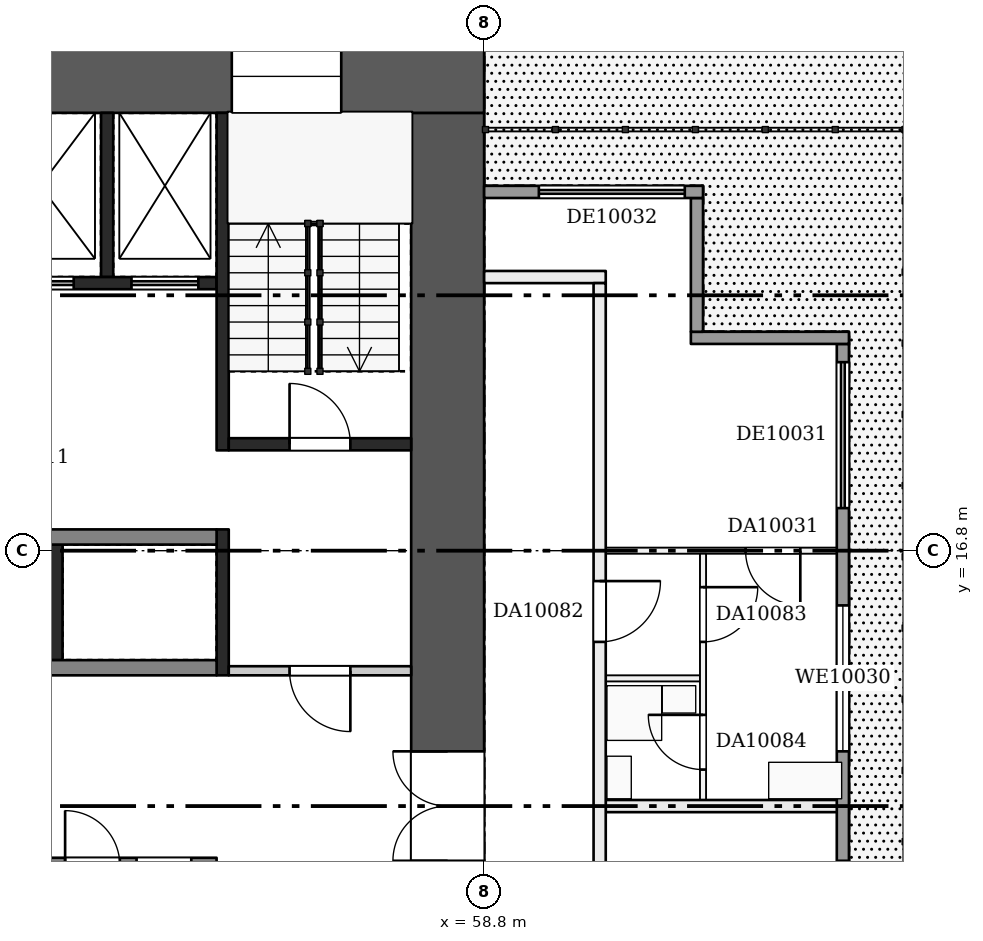
"""IFC4 building model, lengths in metres.
Left out: names, types, materials, properties, quantities, classifications, styles, units other than length and angle.
Written with IfcOpenShell. Run it as: python <this file> out.ifc"""

import sys

from ifc_helpers import new_model, si_unit, direction, frame, frame_2d, origin, place, context, subcontext, project, spatial, rectangle, extrude, element, fill, save


model = new_model("IFC4")
c1 = context("Model", 3, precision=1e-05, world=origin(), true_north=direction((0.0, 1.0)))
c2 = subcontext(c1, "Body", "Model", "MODEL_VIEW")
j1 = project(units=[si_unit("LENGTHUNIT", "METRE"), si_unit("PLANEANGLEUNIT", "RADIAN")], contexts=[c1])
p1 = place(None, origin())
s1 = spatial("IfcSite", under=j1, at=p1, CompositionType="ELEMENT")
p2 = place(p1, origin())
s2 = spatial("IfcBuilding", under=s1, at=p2, CompositionType="ELEMENT")
p3 = place(p2, frame((0.0, 0.0, 46.2)))
s3 = spatial("IfcBuildingStorey", under=s2, at=p3, CompositionType="ELEMENT", Elevation=46.2)
p4 = place(p3, frame((42.0, 24.6, 0.0), z_axis=(0.0, 0.0, 1.0), x_axis=(1.0, 0.0, 0.0)))
e1 = element("IfcWall", 1, at=p4, inside=s3, PredefinedType="SHEAR", context=c2, shape_type="SweptSolid", body=[
    extrude(rectangle(XDim=16.8, YDim=1.2, at=frame_2d((8.4, 0.0))), origin(), (0.0, 0.0, 1.0), 3.22),
])
p5 = place(p4, frame((1.8, 0.0, 0.5)))
e2 = element("IfcOpeningElement", 2, at=p5, cuts=e1, PredefinedType="OPENING", context=c2, shape_type="SweptSolid", body=[
    extrude(rectangle(XDim=1.8, YDim=2.4, at=frame_2d((0.9, 1.2))), frame((0.0, 0.61, 0.0), z_axis=(0.0, -1.0, 0.0), x_axis=(1.0, 0.0, 0.0)), (0.0, 0.0, 1.0), 1.22),
])
p6 = place(p4, frame((4.625, 0.0, 1.6)))
e3 = element("IfcOpeningElement", 3, at=p6, cuts=e1, PredefinedType="OPENING", context=c2, shape_type="SweptSolid", body=[
    extrude(rectangle(XDim=1.8, YDim=1.2, at=frame_2d((0.9, 0.6))), frame((0.0, 0.61, 0.0), z_axis=(0.0, -1.0, 0.0), x_axis=(1.0, 0.0, 0.0)), (0.0, 0.0, 1.0), 1.22),
])
p7 = place(p4, frame((7.05, 0.0, 1.6)))
e4 = element("IfcOpeningElement", 4, at=p7, cuts=e1, PredefinedType="OPENING", context=c2, shape_type="SweptSolid", body=[
    extrude(rectangle(XDim=1.2, YDim=1.2, at=frame_2d((0.6, 0.6))), frame((0.0, 0.61, 0.0), z_axis=(0.0, -1.0, 0.0), x_axis=(1.0, 0.0, 0.0)), (0.0, 0.0, 1.0), 1.22),
])
p8 = place(p4, frame((12.65, 0.0, 0.5)))
e5 = element("IfcOpeningElement", 5, at=p8, cuts=e1, PredefinedType="OPENING", context=c2, shape_type="SweptSolid", body=[
    extrude(rectangle(XDim=1.8, YDim=2.4, at=frame_2d((0.9, 1.2))), frame((0.0, 0.61, 0.0), z_axis=(0.0, -1.0, 0.0), x_axis=(1.0, 0.0, 0.0)), (0.0, 0.0, 1.0), 1.22),
])
p9 = place(p3, frame((58.2, 9.6, 0.0), z_axis=(0.0, 0.0, 1.0), x_axis=(0.0, 1.0, 0.0)))
e6 = element("IfcWall", 6, at=p9, inside=s3, PredefinedType="SHEAR", context=c2, shape_type="SweptSolid", body=[
    extrude(rectangle(XDim=14.4, YDim=1.2, at=frame_2d((7.2, 0.0))), origin(), (0.0, 0.0, 1.0), 3.22),
])
p10 = place(p9, frame((2.1, 0.0, 0.0)))
e7 = element("IfcOpeningElement", 7, at=p10, cuts=e6, PredefinedType="OPENING", context=c2, shape_type="SweptSolid", body=[
    extrude(rectangle(XDim=1.8, YDim=2.1, at=frame_2d((0.9, 1.05))), frame((0.0, 0.61, 0.0), z_axis=(0.0, -1.0, 0.0), x_axis=(1.0, 0.0, 0.0)), (0.0, 0.0, 1.0), 1.22),
])
p11 = place(p3, frame((46.4, 11.625, 0.0), z_axis=(0.0, 0.0, 1.0), x_axis=(1.0, 0.0, 0.0)))
e8 = element("IfcWall", 8, at=p11, inside=s3, PredefinedType="SHEAR", context=c2, shape_type="SweptSolid", body=[
    extrude(rectangle(XDim=8.0, YDim=0.25, at=frame_2d((4.0, 0.0))), origin(), (0.0, 0.0, 1.0), 3.22),
])
p12 = place(p11, frame((0.45, 0.0, 0.0)))
e9 = element("IfcOpeningElement", 9, at=p12, cuts=e8, PredefinedType="OPENING", context=c2, shape_type="SweptSolid", body=[
    extrude(rectangle(XDim=1.1, YDim=2.1, at=frame_2d((0.55, 1.05))), frame((0.0, 0.135, 0.0), z_axis=(0.0, -1.0, 0.0), x_axis=(1.0, 0.0, 0.0)), (0.0, 0.0, 1.0), 0.27),
])
p13 = place(p11, frame((2.25, 0.0, 0.0)))
e10 = element("IfcOpeningElement", 10, at=p13, cuts=e8, PredefinedType="OPENING", context=c2, shape_type="SweptSolid", body=[
    extrude(rectangle(XDim=1.1, YDim=2.1, at=frame_2d((0.55, 1.05))), frame((0.0, 0.135, 0.0), z_axis=(0.0, -1.0, 0.0), x_axis=(1.0, 0.0, 0.0)), (0.0, 0.0, 1.0), 0.27),
])
p14 = place(p11, frame((4.05, 0.0, 0.0)))
e11 = element("IfcOpeningElement", 11, at=p14, cuts=e8, PredefinedType="OPENING", context=c2, shape_type="SweptSolid", body=[
    extrude(rectangle(XDim=1.1, YDim=2.1, at=frame_2d((0.55, 1.05))), frame((0.0, 0.135, 0.0), z_axis=(0.0, -1.0, 0.0), x_axis=(1.0, 0.0, 0.0)), (0.0, 0.0, 1.0), 0.27),
])
p15 = place(p11, frame((5.509, 0.0, 0.0)))
e12 = element("IfcOpeningElement", 12, at=p15, cuts=e8, PredefinedType="OPENING", context=c2, shape_type="SweptSolid", body=[
    extrude(rectangle(XDim=0.9, YDim=2.1, at=frame_2d((0.45, 1.05))), frame((0.0, 0.135, 0.0), z_axis=(0.0, -1.0, 0.0), x_axis=(1.0, 0.0, 0.0)), (0.0, 0.0, 1.0), 0.27),
])
p16 = place(p11, frame((6.684, 0.0, 0.0)))
e13 = element("IfcOpeningElement", 13, at=p16, cuts=e8, PredefinedType="OPENING", context=c2, shape_type="SweptSolid", body=[
    extrude(rectangle(XDim=0.9, YDim=2.1, at=frame_2d((0.45, 1.05))), frame((0.0, 0.135, 0.0), z_axis=(0.0, -1.0, 0.0), x_axis=(1.0, 0.0, 0.0)), (0.0, 0.0, 1.0), 0.27),
])
p17 = place(p3, frame((51.767, 15.0, 0.0), z_axis=(0.0, 0.0, 1.0), x_axis=(0.0, 1.0, 0.0)))
e14 = element("IfcWall", 14, at=p17, inside=s3, PredefinedType="SHEAR", context=c2, shape_type="SweptSolid", body=[
    extrude(rectangle(XDim=1.9, YDim=0.2, at=frame_2d((0.95, 0.0))), origin(), (0.0, 0.0, 1.0), 3.22),
])
for number, where, z_axis, x_axis in (
    (15, (46.4, 14.875, 0.0), (0.0, 0.0, 1.0), (1.0, 0.0, 0.0)),
    (16, (46.4, 17.025, 0.0), (0.0, 0.0, 1.0), (1.0, 0.0, 0.0)),
):
    element("IfcWall", number, at=place(p3, frame(where, z_axis=z_axis, x_axis=x_axis)), inside=s3, PredefinedType="SHEAR", context=c2, shape_type="SweptSolid", body=[
        extrude(rectangle(XDim=8.0, YDim=0.25, at=frame_2d((4.0, 0.0))), origin(), (0.0, 0.0, 1.0), 3.22),
    ])
p18 = place(p3, frame((52.6, 21.3, 0.0), z_axis=(0.0, 0.0, 1.0), x_axis=(0.0, 1.0, 0.0)))
e17 = element("IfcWall", 17, at=p18, inside=s3, PredefinedType="SHEAR", context=c2, shape_type="SweptSolid", body=[
    extrude(rectangle(XDim=2.7, YDim=0.2, at=frame_2d((1.35, 0.0))), origin(), (0.0, 0.0, 1.0), 3.22),
])
p19 = place(p3, frame((46.4, 21.2, 0.0), z_axis=(0.0, 0.0, 1.0), x_axis=(1.0, 0.0, 0.0)))
e18 = element("IfcWall", 18, at=p19, inside=s3, PredefinedType="SHEAR", context=c2, shape_type="SweptSolid", body=[
    extrude(rectangle(XDim=8.0, YDim=0.2, at=frame_2d((4.0, 0.0))), origin(), (0.0, 0.0, 1.0), 3.22),
])
p20 = place(p19, frame((0.675, 0.0, 0.0)))
e19 = element("IfcOpeningElement", 19, at=p20, cuts=e18, PredefinedType="OPENING", context=c2, shape_type="SweptSolid", body=[
    extrude(rectangle(XDim=0.9, YDim=2.1, at=frame_2d((0.45, 1.05))), frame((0.0, 0.11, 0.0), z_axis=(0.0, -1.0, 0.0), x_axis=(1.0, 0.0, 0.0)), (0.0, 0.0, 1.0), 0.22),
])
p21 = place(p19, frame((2.7, 0.0, 0.0)))
e20 = element("IfcOpeningElement", 20, at=p21, cuts=e18, PredefinedType="OPENING", context=c2, shape_type="SweptSolid", body=[
    extrude(rectangle(XDim=0.9, YDim=2.1, at=frame_2d((0.45, 1.05))), frame((0.0, 0.11, 0.0), z_axis=(0.0, -1.0, 0.0), x_axis=(1.0, 0.0, 0.0)), (0.0, 0.0, 1.0), 0.22),
])
p22 = place(p19, frame((4.55, 0.0, 0.0)))
e21 = element("IfcOpeningElement", 21, at=p22, cuts=e18, PredefinedType="OPENING", context=c2, shape_type="SweptSolid", body=[
    extrude(rectangle(XDim=1.1, YDim=2.1, at=frame_2d((0.55, 1.05))), frame((0.0, 0.11, 0.0), z_axis=(0.0, -1.0, 0.0), x_axis=(1.0, 0.0, 0.0)), (0.0, 0.0, 1.0), 0.22),
])
p23 = place(p19, frame((6.6, 0.0, 0.0)))
e22 = element("IfcOpeningElement", 22, at=p23, cuts=e18, PredefinedType="OPENING", context=c2, shape_type="SweptSolid", body=[
    extrude(rectangle(XDim=1.1, YDim=2.1, at=frame_2d((0.55, 1.05))), frame((0.0, 0.11, 0.0), z_axis=(0.0, -1.0, 0.0), x_axis=(1.0, 0.0, 0.0)), (0.0, 0.0, 1.0), 0.22),
])
p24 = place(p3, frame((54.5, 14.75, 0.0), z_axis=(0.0, 0.0, 1.0), x_axis=(0.0, 1.0, 0.0)))
e23 = element("IfcWall", 23, at=p24, inside=s3, PredefinedType="SHEAR", context=c2, shape_type="SweptSolid", body=[
    extrude(rectangle(XDim=2.4, YDim=0.2, at=frame_2d((1.2, 0.0))), origin(), (0.0, 0.0, 1.0), 3.22),
])
p25 = place(p3, frame((54.5, 18.45, 0.0), z_axis=(0.0, 0.0, 1.0), x_axis=(0.0, 1.0, 0.0)))
e24 = element("IfcWall", 24, at=p25, inside=s3, PredefinedType="SHEAR", context=c2, shape_type="SweptSolid", body=[
    extrude(rectangle(XDim=5.55, YDim=0.2, at=frame_2d((2.775, 0.0))), origin(), (0.0, 0.0, 1.0), 3.22),
])
p26 = place(p3, frame((54.6, 14.825, 0.0), z_axis=(0.0, 0.0, 1.0), x_axis=(1.0, 0.0, 0.0)))
e25 = element("IfcWall", 25, at=p26, inside=s3, PredefinedType="PARTITIONING", context=c2, shape_type="SweptSolid", body=[
    extrude(rectangle(XDim=3.0, YDim=0.15, at=frame_2d((1.5, 0.0))), origin(), (0.0, 0.0, 1.0), 3.22),
])
p27 = place(p26, frame((1.0, 0.0, 0.0)))
e26 = element("IfcOpeningElement", 26, at=p27, cuts=e25, PredefinedType="OPENING", context=c2, shape_type="SweptSolid", body=[
    extrude(rectangle(XDim=1.0, YDim=2.1, at=frame_2d((0.5, 1.05))), frame((0.0, 0.085, 0.0), z_axis=(0.0, -1.0, 0.0), x_axis=(1.0, 0.0, 0.0)), (0.0, 0.0, 1.0), 0.17),
])
p28 = place(p3, frame((54.6, 18.55, 0.0), z_axis=(0.0, 0.0, 1.0), x_axis=(1.0, 0.0, 0.0)))
e27 = element("IfcWall", 27, at=p28, inside=s3, PredefinedType="SHEAR", context=c2, shape_type="SweptSolid", body=[
    extrude(rectangle(XDim=3.0, YDim=0.2, at=frame_2d((1.5, 0.0))), origin(), (0.0, 0.0, 1.0), 3.22),
])
p29 = place(p28, frame((1.0, 0.0, 0.0)))
e28 = element("IfcOpeningElement", 28, at=p29, cuts=e27, PredefinedType="OPENING", context=c2, shape_type="SweptSolid", body=[
    extrude(rectangle(XDim=1.0, YDim=2.1, at=frame_2d((0.5, 1.05))), frame((0.0, 0.11, 0.0), z_axis=(0.0, -1.0, 0.0), x_axis=(1.0, 0.0, 0.0)), (0.0, 0.0, 1.0), 0.22),
])
p30 = place(p3, frame((60.8, 12.6, 0.0), z_axis=(0.0, 0.0, 1.0), x_axis=(1.0, 0.0, 0.0)))
e29 = element("IfcWall", 29, at=p30, inside=s3, PredefinedType="PARTITIONING", context=c2, shape_type="SweptSolid", body=[
    extrude(rectangle(XDim=3.9, YDim=0.2, at=frame_2d((1.95, 0.0))), origin(), (0.0, 0.0, 1.0), 3.22),
])
p31 = place(p3, frame((60.8, 14.7, 0.0), z_axis=(0.0, 0.0, 1.0), x_axis=(1.0, 0.0, 0.0)))
e30 = element("IfcWall", 30, at=p31, inside=s3, PredefinedType="PARTITIONING", context=c2, shape_type="SweptSolid", body=[
    extrude(rectangle(XDim=1.55, YDim=0.1, at=frame_2d((0.775, 0.0))), origin(), (0.0, 0.0, 1.0), 3.22),
])
p32 = place(p3, frame((60.8, 16.8, 0.0), z_axis=(0.0, 0.0, 1.0), x_axis=(1.0, 0.0, 0.0)))
e31 = element("IfcWall", 31, at=p32, inside=s3, PredefinedType="PARTITIONING", context=c2, shape_type="SweptSolid", body=[
    extrude(rectangle(XDim=3.9, YDim=0.1, at=frame_2d((1.95, 0.0))), origin(), (0.0, 0.0, 1.0), 3.22),
])
p33 = place(p32, frame((2.3, 0.0, 0.0)))
e32 = element("IfcOpeningElement", 32, at=p33, cuts=e31, PredefinedType="OPENING", context=c2, shape_type="SweptSolid", body=[
    extrude(rectangle(XDim=0.9, YDim=2.1, at=frame_2d((0.45, 1.05))), frame((0.0, 0.06, 0.0), z_axis=(0.0, -1.0, 0.0), x_axis=(1.0, 0.0, 0.0)), (0.0, 0.0, 1.0), 0.12),
])
p34 = place(p3, frame((58.8, 21.3, 0.0), z_axis=(0.0, 0.0, 1.0), x_axis=(1.0, 0.0, 0.0)))
e33 = element("IfcWall", 33, at=p34, inside=s3, PredefinedType="PARTITIONING", context=c2, shape_type="SweptSolid", body=[
    extrude(rectangle(XDim=2.0, YDim=0.2, at=frame_2d((1.0, 0.0))), origin(), (0.0, 0.0, 1.0), 3.22),
])
p35 = place(p3, frame((60.7, 6.6, 0.0), z_axis=(0.0, 0.0, 1.0), x_axis=(0.0, 1.0, 0.0)))
e34 = element("IfcWall", 34, at=p35, inside=s3, PredefinedType="PARTITIONING", context=c2, shape_type="SweptSolid", body=[
    extrude(rectangle(XDim=14.6, YDim=0.2, at=frame_2d((7.3, 0.0))), origin(), (0.0, 0.0, 1.0), 3.22),
])
p36 = place(p35, frame((3.4, 0.0, 0.0)))
e35 = element("IfcOpeningElement", 35, at=p36, cuts=e34, PredefinedType="OPENING", context=c2, shape_type="SweptSolid", body=[
    extrude(rectangle(XDim=1.0, YDim=2.1, at=frame_2d((0.5, 1.05))), frame((0.0, 0.11, 0.0), z_axis=(0.0, -1.0, 0.0), x_axis=(1.0, 0.0, 0.0)), (0.0, 0.0, 1.0), 0.22),
])
p37 = place(p35, frame((8.7, 0.0, 0.0)))
e36 = element("IfcOpeningElement", 36, at=p37, cuts=e34, PredefinedType="OPENING", context=c2, shape_type="SweptSolid", body=[
    extrude(rectangle(XDim=1.0, YDim=2.1, at=frame_2d((0.5, 1.05))), frame((0.0, 0.11, 0.0), z_axis=(0.0, -1.0, 0.0), x_axis=(1.0, 0.0, 0.0)), (0.0, 0.0, 1.0), 0.22),
])
p38 = place(p3, frame((62.4, 12.7, 0.0), z_axis=(0.0, 0.0, 1.0), x_axis=(0.0, 1.0, 0.0)))
e37 = element("IfcWall", 37, at=p38, inside=s3, PredefinedType="PARTITIONING", context=c2, shape_type="SweptSolid", body=[
    extrude(rectangle(XDim=4.05, YDim=0.1, at=frame_2d((2.025, 0.0))), origin(), (0.0, 0.0, 1.0), 3.22),
])
p39 = place(p38, frame((2.6, 0.0, 0.0)))
e38 = element("IfcOpeningElement", 38, at=p39, cuts=e37, PredefinedType="OPENING", context=c2, shape_type="SweptSolid", body=[
    extrude(rectangle(XDim=0.9, YDim=2.1, at=frame_2d((0.45, 1.05))), frame((0.0, 0.06, 0.0), z_axis=(0.0, -1.0, 0.0), x_axis=(1.0, 0.0, 0.0)), (0.0, 0.0, 1.0), 0.12),
])
p40 = place(p38, frame((0.5, 0.0, 0.0)))
e39 = element("IfcOpeningElement", 39, at=p40, cuts=e37, PredefinedType="OPENING", context=c2, shape_type="SweptSolid", body=[
    extrude(rectangle(XDim=0.9, YDim=2.1, at=frame_2d((0.45, 1.05))), frame((0.0, 0.06, 0.0), z_axis=(0.0, -1.0, 0.0), x_axis=(1.0, 0.0, 0.0)), (0.0, 0.0, 1.0), 0.12),
])
p41 = place(p3, frame((64.7, 5.0, 0.0), z_axis=(0.0, 0.0, 1.0), x_axis=(0.0, 1.0, 0.0)))
e40 = element("IfcWall", 40, at=p41, inside=s3, PredefinedType="SOLIDWALL", context=c2, shape_type="SweptSolid", body=[
    extrude(rectangle(XDim=15.2, YDim=0.2, at=frame_2d((7.6, 0.0))), origin(), (0.0, 0.0, 1.0), 3.22),
])
p42 = place(p41, frame((0.3, 0.0, 0.9)))
e41 = element("IfcOpeningElement", 41, at=p42, cuts=e40, PredefinedType="OPENING", context=c2, shape_type="SweptSolid", body=[
    extrude(rectangle(XDim=2.4, YDim=1.5, at=frame_2d((1.2, 0.75))), frame((0.0, 0.11, 0.0), z_axis=(0.0, -1.0, 0.0), x_axis=(1.0, 0.0, 0.0)), (0.0, 0.0, 1.0), 0.22),
])
p43 = place(p41, frame((4.3, 0.0, 0.9)))
e42 = element("IfcOpeningElement", 42, at=p43, cuts=e40, PredefinedType="OPENING", context=c2, shape_type="SweptSolid", body=[
    extrude(rectangle(XDim=2.4, YDim=1.5, at=frame_2d((1.2, 0.75))), frame((0.0, 0.11, 0.0), z_axis=(0.0, -1.0, 0.0), x_axis=(1.0, 0.0, 0.0)), (0.0, 0.0, 1.0), 0.22),
])
p44 = place(p41, frame((8.5, 0.0, 0.9)))
e43 = element("IfcOpeningElement", 43, at=p44, cuts=e40, PredefinedType="OPENING", context=c2, shape_type="SweptSolid", body=[
    extrude(rectangle(XDim=2.4, YDim=1.5, at=frame_2d((1.2, 0.75))), frame((0.0, 0.11, 0.0), z_axis=(0.0, -1.0, 0.0), x_axis=(1.0, 0.0, 0.0)), (0.0, 0.0, 1.0), 0.22),
])
p45 = place(p41, frame((12.5, 0.0, 0.0)))
e44 = element("IfcOpeningElement", 44, at=p45, cuts=e40, PredefinedType="OPENING", context=c2, shape_type="SweptSolid", body=[
    extrude(rectangle(XDim=2.4, YDim=2.2, at=frame_2d((1.2, 1.1))), frame((0.0, 0.11, 0.0), z_axis=(0.0, -1.0, 0.0), x_axis=(1.0, 0.0, 0.0)), (0.0, 0.0, 1.0), 0.22),
])
p46 = place(p3, frame((64.8, 20.3, 0.0), z_axis=(0.0, 0.0, 1.0), x_axis=(-1.0, 0.0, 0.0)))
e45 = element("IfcWall", 45, at=p46, inside=s3, PredefinedType="SOLIDWALL", context=c2, shape_type="SweptSolid", body=[
    extrude(rectangle(XDim=2.6, YDim=0.2, at=frame_2d((1.3, 0.0))), origin(), (0.0, 0.0, 1.0), 3.22),
])
p47 = place(p3, frame((62.3, 20.4, 0.0), z_axis=(0.0, 0.0, 1.0), x_axis=(0.0, 1.0, 0.0)))
e46 = element("IfcWall", 46, at=p47, inside=s3, PredefinedType="SOLIDWALL", context=c2, shape_type="SweptSolid", body=[
    extrude(rectangle(XDim=2.2, YDim=0.2, at=frame_2d((1.1, 0.0))), origin(), (0.0, 0.0, 1.0), 3.22),
])
p48 = place(p3, frame((62.4, 22.7, 0.0), z_axis=(0.0, 0.0, 1.0), x_axis=(-1.0, 0.0, 0.0)))
e47 = element("IfcWall", 47, at=p48, inside=s3, PredefinedType="SOLIDWALL", context=c2, shape_type="SweptSolid", body=[
    extrude(rectangle(XDim=3.6, YDim=0.2, at=frame_2d((1.8, 0.0))), origin(), (0.0, 0.0, 1.0), 3.22),
])
p49 = place(p48, frame((0.3, 0.0, 0.0)))
e48 = element("IfcOpeningElement", 48, at=p49, cuts=e47, PredefinedType="OPENING", context=c2, shape_type="SweptSolid", body=[
    extrude(rectangle(XDim=2.4, YDim=2.2, at=frame_2d((1.2, 1.1))), frame((0.0, 0.11, 0.0), z_axis=(0.0, -1.0, 0.0), x_axis=(1.0, 0.0, 0.0)), (0.0, 0.0, 1.0), 0.22),
])
p50 = place(p10, origin())
e49 = element("IfcDoor", 49, at=p50, inside=s3, OperationType="DOUBLE_DOOR_SINGLE_SWING", PredefinedType="DOOR", context=c2, shape_type="SweptSolid", body=[
    extrude(rectangle(XDim=1.8, YDim=2.1, at=frame_2d((0.9, 1.05))), frame((0.0, 0.025, 0.0), z_axis=(0.0, -1.0, 0.0), x_axis=(1.0, 0.0, 0.0)), (0.0, 0.0, 1.0), 0.05),
])
fill(e7, e49)
p51 = place(p22, origin())
e50 = element("IfcDoor", 50, at=p51, inside=s3, OperationType="DOUBLE_DOOR_SLIDING", PredefinedType="DOOR", context=c2, shape_type="SweptSolid", body=[
    extrude(rectangle(XDim=1.1, YDim=2.1, at=frame_2d((0.55, 1.05))), frame((0.0, 0.025, 0.0), z_axis=(0.0, -1.0, 0.0), x_axis=(1.0, 0.0, 0.0)), (0.0, 0.0, 1.0), 0.05),
])
fill(e21, e50)
p52 = place(p23, origin())
e51 = element("IfcDoor", 51, at=p52, inside=s3, OperationType="DOUBLE_DOOR_SLIDING", PredefinedType="DOOR", context=c2, shape_type="SweptSolid", body=[
    extrude(rectangle(XDim=1.1, YDim=2.1, at=frame_2d((0.55, 1.05))), frame((0.0, 0.025, 0.0), z_axis=(0.0, -1.0, 0.0), x_axis=(1.0, 0.0, 0.0)), (0.0, 0.0, 1.0), 0.05),
])
fill(e22, e51)
p53 = place(p27, frame((1.0, 0.0, 0.0), z_axis=(0.0, 0.0, 1.0), x_axis=(-1.0, 0.0, 0.0)))
e52 = element("IfcDoor", 52, at=p53, inside=s3, OperationType="SINGLE_SWING_LEFT", PredefinedType="DOOR", context=c2, shape_type="SweptSolid", body=[
    extrude(rectangle(XDim=1.0, YDim=2.1, at=frame_2d((0.5, 1.05))), frame((0.0, 0.025, 0.0), z_axis=(0.0, -1.0, 0.0), x_axis=(1.0, 0.0, 0.0)), (0.0, 0.0, 1.0), 0.05),
])
fill(e26, e52)
p54 = place(p29, origin())
e53 = element("IfcDoor", 53, at=p54, inside=s3, OperationType="SINGLE_SWING_LEFT", PredefinedType="DOOR", context=c2, shape_type="SweptSolid", body=[
    extrude(rectangle(XDim=1.0, YDim=2.1, at=frame_2d((0.5, 1.05))), frame((0.0, 0.025, 0.0), z_axis=(0.0, -1.0, 0.0), x_axis=(1.0, 0.0, 0.0)), (0.0, 0.0, 1.0), 0.05),
])
fill(e28, e53)
p55 = place(p8, origin())
e54 = element("IfcWindow", 54, at=p55, inside=s3, PartitioningType="SINGLE_PANEL", PredefinedType="WINDOW", context=c2, shape_type="SweptSolid", body=[
    extrude(rectangle(XDim=1.8, YDim=2.4, at=frame_2d((0.9, 1.2))), frame((0.0, 0.03, 0.0), z_axis=(0.0, -1.0, 0.0), x_axis=(1.0, 0.0, 0.0)), (0.0, 0.0, 1.0), 0.06),
])
fill(e5, e54)
p56 = place(p33, frame((0.9, 0.0, 0.0), z_axis=(0.0, 0.0, 1.0), x_axis=(-1.0, 0.0, 0.0)))
e55 = element("IfcDoor", 55, at=p56, inside=s3, OperationType="SINGLE_SWING_LEFT", PredefinedType="DOOR", context=c2, shape_type="SweptSolid", body=[
    extrude(rectangle(XDim=0.9, YDim=2.1, at=frame_2d((0.45, 1.05))), frame((0.0, 0.025, 0.0), z_axis=(0.0, -1.0, 0.0), x_axis=(1.0, 0.0, 0.0)), (0.0, 0.0, 1.0), 0.05),
])
fill(e32, e55)
p57 = place(p37, frame((1.0, 0.0, 0.0), z_axis=(0.0, 0.0, 1.0), x_axis=(-1.0, 0.0, 0.0)))
e56 = element("IfcDoor", 56, at=p57, inside=s3, OperationType="SINGLE_SWING_LEFT", PredefinedType="DOOR", context=c2, shape_type="SweptSolid", body=[
    extrude(rectangle(XDim=1.0, YDim=2.1, at=frame_2d((0.5, 1.05))), frame((0.0, 0.025, 0.0), z_axis=(0.0, -1.0, 0.0), x_axis=(1.0, 0.0, 0.0)), (0.0, 0.0, 1.0), 0.05),
])
fill(e36, e56)
p58 = place(p39, frame((0.9, 0.0, 0.0), z_axis=(0.0, 0.0, 1.0), x_axis=(-1.0, 0.0, 0.0)))
e57 = element("IfcDoor", 57, at=p58, inside=s3, OperationType="SINGLE_SWING_LEFT", PredefinedType="DOOR", context=c2, shape_type="SweptSolid", body=[
    extrude(rectangle(XDim=0.9, YDim=2.1, at=frame_2d((0.45, 1.05))), frame((0.0, 0.025, 0.0), z_axis=(0.0, -1.0, 0.0), x_axis=(1.0, 0.0, 0.0)), (0.0, 0.0, 1.0), 0.05),
])
fill(e38, e57)
p59 = place(p40, origin())
e58 = element("IfcDoor", 58, at=p59, inside=s3, OperationType="SINGLE_SWING_RIGHT", PredefinedType="DOOR", context=c2, shape_type="SweptSolid", body=[
    extrude(rectangle(XDim=0.9, YDim=2.1, at=frame_2d((0.45, 1.05))), frame((0.0, 0.025, 0.0), z_axis=(0.0, -1.0, 0.0), x_axis=(1.0, 0.0, 0.0)), (0.0, 0.0, 1.0), 0.05),
])
fill(e39, e58)
p60 = place(p44, origin())
e59 = element("IfcWindow", 59, at=p60, inside=s3, PartitioningType="SINGLE_PANEL", PredefinedType="WINDOW", context=c2, shape_type="SweptSolid", body=[
    extrude(rectangle(XDim=2.4, YDim=1.5, at=frame_2d((1.2, 0.75))), frame((0.0, 0.03, 0.0), z_axis=(0.0, -1.0, 0.0), x_axis=(1.0, 0.0, 0.0)), (0.0, 0.0, 1.0), 0.06),
])
fill(e43, e59)
p61 = place(p45, origin())
e60 = element("IfcDoor", 60, at=p61, inside=s3, OperationType="DOUBLE_DOOR_SLIDING", PredefinedType="DOOR", context=c2, shape_type="SweptSolid", body=[
    extrude(rectangle(XDim=2.4, YDim=2.2, at=frame_2d((1.2, 1.1))), frame((0.0, 0.025, 0.0), z_axis=(0.0, -1.0, 0.0), x_axis=(1.0, 0.0, 0.0)), (0.0, 0.0, 1.0), 0.05),
])
fill(e44, e60)
p62 = place(p49, origin())
e61 = element("IfcDoor", 61, at=p62, inside=s3, OperationType="DOUBLE_DOOR_SLIDING", PredefinedType="DOOR", context=c2, shape_type="SweptSolid", body=[
    extrude(rectangle(XDim=2.4, YDim=2.2, at=frame_2d((1.2, 1.1))), frame((0.0, 0.025, 0.0), z_axis=(0.0, -1.0, 0.0), x_axis=(1.0, 0.0, 0.0)), (0.0, 0.0, 1.0), 0.05),
])
fill(e48, e61)
save(model, sys.argv[1])
